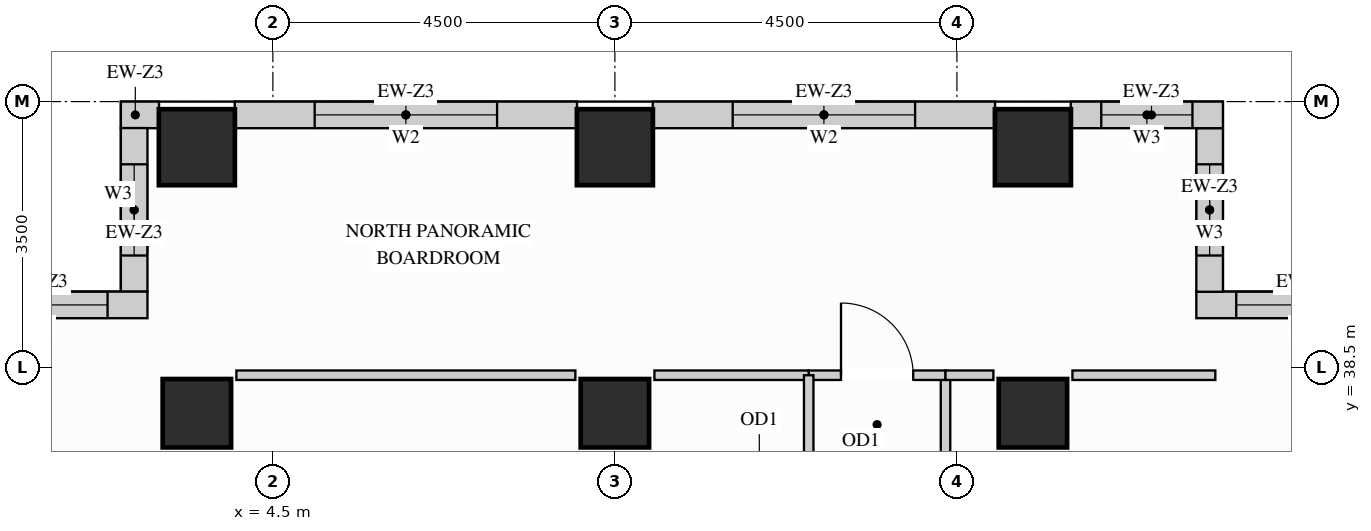
"""IFC4 building model, lengths in metres.
Left out: names, types, materials, properties, quantities, classifications, styles, units other than length and angle.
Written with IfcOpenShell. Run it as: python <this file> out.ifc"""

import sys

from ifc_helpers import new_model, si_unit, direction, frame, frame_2d, origin, origin_2d, place, context, subcontext, project, spatial, rectangle, extrude, source, transform, mapped, element, fill, save


model = new_model("IFC4")
c1 = context("Model", 3, precision=1e-05, world=origin(), true_north=direction((0.0, 1.0)))
c2 = subcontext(c1, "Body", "Model", "MODEL_VIEW")
j1 = project(units=[si_unit("LENGTHUNIT", "METRE"), si_unit("PLANEANGLEUNIT", "RADIAN")], contexts=[c1])
p1 = place(None, origin())
s1 = spatial("IfcSite", under=j1, at=p1, CompositionType="ELEMENT")
p2 = place(p1, origin())
s2 = spatial("IfcBuilding", under=s1, at=p2, CompositionType="ELEMENT")
p3 = place(p2, frame((0.0, 0.0, 186.3)))
s3 = spatial("IfcBuildingStorey", under=s2, at=p3, CompositionType="ELEMENT", Elevation=186.3)
m1 = source(origin(), c2, "Body", "SweptSolid", [
    extrude(rectangle(XDim=0.9, YDim=0.9, at=origin_2d()), origin(), (0.0, 0.0, 1.0), 3.4),
])
for number, where, z_axis, x_axis in (
    (1, (14.5, 37.9, 0.0), (0.0, 0.0, 1.0), (1.0, 0.0, 0.0)),
    (2, (3.5, 37.9, 0.0), (0.0, 0.0, 1.0), (1.0, 0.0, 0.0)),
    (3, (9.0, 37.9, 0.0), (0.0, 0.0, 1.0), (1.0, 0.0, 0.0)),
):
    element("IfcColumn", number, at=place(p3, frame(where, z_axis=z_axis, x_axis=x_axis)), inside=s3, PredefinedType="COLUMN", context=c2, shape_type="MappedRepresentation", body=[
        mapped(m1, transform((0.0, 0.0, 0.0), x_axis=(1.0, 0.0, 0.0), y_axis=(0.0, 1.0, 0.0), z_axis=(0.0, 0.0, 1.0))),
    ])
m2 = source(origin(), c2, "Body", "SweptSolid", [
    extrude(rectangle(XDim=1.0, YDim=1.0, at=origin_2d()), origin(), (0.0, 0.0, 1.0), 3.4),
])
for number, where, z_axis, x_axis in (
    (4, (14.5, 41.4, 0.0), (0.0, 0.0, 1.0), (1.0, 0.0, 0.0)),
    (5, (3.5, 41.4, 0.0), (0.0, 0.0, 1.0), (1.0, 0.0, 0.0)),
    (6, (9.0, 41.4, 0.0), (0.0, 0.0, 1.0), (1.0, 0.0, 0.0)),
):
    element("IfcColumn", number, at=place(p3, frame(where, z_axis=z_axis, x_axis=x_axis)), inside=s3, PredefinedType="COLUMN", context=c2, shape_type="MappedRepresentation", body=[
        mapped(m2, transform((0.0, 0.0, 0.0), x_axis=(1.0, 0.0, 0.0), y_axis=(0.0, 1.0, 0.0), z_axis=(0.0, 0.0, 1.0))),
    ])
p4 = place(p3, frame((19.5, 39.325, 0.0), z_axis=(0.0, 0.0, 1.0), x_axis=(-1.0, 0.0, 0.0)))
e7 = element("IfcWall", 7, at=p4, inside=s3, PredefinedType="SOLIDWALL", context=c2, shape_type="SweptSolid", body=[
    extrude(rectangle(XDim=2.85, YDim=0.35, at=frame_2d((1.425, 0.0))), origin(), (0.0, 0.0, 1.0), 3.385),
])
p5 = place(p4, frame((0.525, 0.0, 0.78)))
e8 = element("IfcOpeningElement", 8, at=p5, cuts=e7, PredefinedType="OPENING", context=c2, shape_type="SweptSolid", body=[
    extrude(rectangle(XDim=1.8, YDim=2.1, at=frame_2d((0.9, 1.05))), frame((0.0, 0.185, 0.0), z_axis=(0.0, -1.0, 0.0), x_axis=(1.0, 0.0, 0.0)), (0.0, 0.0, 1.0), 0.37),
])
p6 = place(p3, frame((16.825, 39.498, 0.0), z_axis=(0.0, 0.0, 1.0), x_axis=(0.0, 1.0, 0.0)))
e9 = element("IfcWall", 9, at=p6, inside=s3, PredefinedType="SOLIDWALL", context=c2, shape_type="SweptSolid", body=[
    extrude(rectangle(XDim=2.154, YDim=0.35, at=frame_2d((1.077, 0.0))), origin(), (0.0, 0.0, 1.0), 3.385),
])
p7 = place(p6, frame((0.477, 0.0, 0.78)))
e10 = element("IfcOpeningElement", 10, at=p7, cuts=e9, PredefinedType="OPENING", context=c2, shape_type="SweptSolid", body=[
    extrude(rectangle(XDim=1.2, YDim=2.1, at=frame_2d((0.6, 1.05))), frame((0.0, 0.185, 0.0), z_axis=(0.0, -1.0, 0.0), x_axis=(1.0, 0.0, 0.0)), (0.0, 0.0, 1.0), 0.37),
])
p8 = place(p3, frame((17.0, 41.825, 0.0), z_axis=(0.0, 0.0, 1.0), x_axis=(-1.0, 0.0, 0.0)))
e11 = element("IfcWall", 11, at=p8, inside=s3, PredefinedType="SOLIDWALL", context=c2, shape_type="SweptSolid", body=[
    extrude(rectangle(XDim=2.002, YDim=0.35, at=frame_2d((1.001, 0.0))), origin(), (0.0, 0.0, 1.0), 3.385),
])
p9 = place(p8, frame((0.401, 0.0, 0.78)))
e12 = element("IfcOpeningElement", 12, at=p9, cuts=e11, PredefinedType="OPENING", context=c2, shape_type="SweptSolid", body=[
    extrude(rectangle(XDim=1.2, YDim=2.1, at=frame_2d((0.6, 1.05))), frame((0.0, 0.185, 0.0), z_axis=(0.0, -1.0, 0.0), x_axis=(1.0, 0.0, 0.0)), (0.0, 0.0, 1.0), 0.37),
])
p10 = place(p3, frame((14.002, 41.825, 0.0), z_axis=(0.0, 0.0, 1.0), x_axis=(-1.0, 0.0, 0.0)))
e13 = element("IfcWall", 13, at=p10, inside=s3, PredefinedType="SOLIDWALL", context=c2, shape_type="SweptSolid", body=[
    extrude(rectangle(XDim=4.504, YDim=0.35, at=frame_2d((2.252, 0.0))), origin(), (0.0, 0.0, 1.0), 2.612),
])
p11 = place(p10, frame((1.052, 0.0, 0.78)))
e14 = element("IfcOpeningElement", 14, at=p11, cuts=e13, PredefinedType="OPENING", context=c2, shape_type="SweptSolid", body=[
    extrude(rectangle(XDim=2.4, YDim=1.652, at=frame_2d((1.2, 0.826))), frame((0.0, 0.185, 0.0), z_axis=(0.0, -1.0, 0.0), x_axis=(1.0, 0.0, 0.0)), (0.0, 0.0, 1.0), 0.37),
])
p12 = place(p3, frame((8.502, 41.825, 0.0), z_axis=(0.0, 0.0, 1.0), x_axis=(-1.0, 0.0, 0.0)))
e15 = element("IfcWall", 15, at=p12, inside=s3, PredefinedType="SOLIDWALL", context=c2, shape_type="SweptSolid", body=[
    extrude(rectangle(XDim=4.504, YDim=0.35, at=frame_2d((2.252, 0.0))), origin(), (0.0, 0.0, 1.0), 2.612),
])
p13 = place(p12, frame((1.052, 0.0, 0.78)))
e16 = element("IfcOpeningElement", 16, at=p13, cuts=e15, PredefinedType="OPENING", context=c2, shape_type="SweptSolid", body=[
    extrude(rectangle(XDim=2.4, YDim=1.652, at=frame_2d((1.2, 0.826))), frame((0.0, 0.185, 0.0), z_axis=(0.0, -1.0, 0.0), x_axis=(1.0, 0.0, 0.0)), (0.0, 0.0, 1.0), 0.37),
])
m3 = source(origin(), c2, "Body", "SweptSolid", [
    extrude(rectangle(XDim=0.502, YDim=0.35, at=frame_2d((0.251, 0.0))), origin(), (0.0, 0.0, 1.0), 3.385),
])
p14 = place(p3, frame((3.002, 41.825, 0.0), z_axis=(0.0, 0.0, 1.0), x_axis=(-1.0, 0.0, 0.0)))
e17 = element("IfcWall", 17, at=p14, inside=s3, PredefinedType="SOLIDWALL", context=c2, shape_type="MappedRepresentation", body=[
    mapped(m3, transform((0.0, 0.0, 0.0), x_axis=(1.0, 0.0, 0.0), y_axis=(0.0, 1.0, 0.0), z_axis=(0.0, 0.0, 1.0))),
])
p15 = place(p3, frame((2.675, 41.652, 0.0), z_axis=(0.0, 0.0, 1.0), x_axis=(0.0, -1.0, 0.0)))
e18 = element("IfcWall", 18, at=p15, inside=s3, PredefinedType="SOLIDWALL", context=c2, shape_type="SweptSolid", body=[
    extrude(rectangle(XDim=2.154, YDim=0.35, at=frame_2d((1.077, 0.0))), origin(), (0.0, 0.0, 1.0), 3.385),
])
p16 = place(p15, frame((0.477, 0.0, 0.78)))
e19 = element("IfcOpeningElement", 19, at=p16, cuts=e18, PredefinedType="OPENING", context=c2, shape_type="SweptSolid", body=[
    extrude(rectangle(XDim=1.2, YDim=2.1, at=frame_2d((0.6, 1.05))), frame((0.0, 0.185, 0.0), z_axis=(0.0, -1.0, 0.0), x_axis=(1.0, 0.0, 0.0)), (0.0, 0.0, 1.0), 0.37),
])
p17 = place(p3, frame((2.85, 39.325, 0.0), z_axis=(0.0, 0.0, 1.0), x_axis=(-1.0, 0.0, 0.0)))
e20 = element("IfcWall", 20, at=p17, inside=s3, PredefinedType="SOLIDWALL", context=c2, shape_type="SweptSolid", body=[
    extrude(rectangle(XDim=2.85, YDim=0.35, at=frame_2d((1.425, 0.0))), origin(), (0.0, 0.0, 1.0), 3.385),
])
p18 = place(p17, frame((0.525, 0.0, 0.78)))
e21 = element("IfcOpeningElement", 21, at=p18, cuts=e20, PredefinedType="OPENING", context=c2, shape_type="SweptSolid", body=[
    extrude(rectangle(XDim=1.8, YDim=2.1, at=frame_2d((0.9, 1.05))), frame((0.0, 0.185, 0.0), z_axis=(0.0, -1.0, 0.0), x_axis=(1.0, 0.0, 0.0)), (0.0, 0.0, 1.0), 0.37),
])
p19 = place(p3, frame((13.35, 35.738, 0.0), z_axis=(0.0, 0.0, 1.0), x_axis=(0.0, 1.0, 0.0)))
e22 = element("IfcWall", 22, at=p19, inside=s3, PredefinedType="PARTITIONING", context=c2, shape_type="SweptSolid", body=[
    extrude(rectangle(XDim=2.662, YDim=0.125, at=frame_2d((1.331, 0.0))), origin(), (0.0, 0.0, 1.0), 3.385),
])
p20 = place(p19, frame((0.18, 0.0, 0.0)))
e23 = element("IfcOpeningElement", 23, at=p20, cuts=e22, PredefinedType="OPENING", context=c2, shape_type="SweptSolid", body=[
    extrude(rectangle(XDim=0.95, YDim=2.15, at=frame_2d((0.475, 1.075))), frame((0.0, 0.073, 0.0), z_axis=(0.0, -1.0, 0.0), x_axis=(1.0, 0.0, 0.0)), (0.0, 0.0, 1.0), 0.145),
])
p21 = place(p3, frame((11.55, 38.4, 0.0), z_axis=(0.0, 0.0, 1.0), x_axis=(1.0, 0.0, 0.0)))
e24 = element("IfcWall", 24, at=p21, inside=s3, PredefinedType="PARTITIONING", context=c2, shape_type="SweptSolid", body=[
    extrude(rectangle(XDim=1.8, YDim=0.125, at=frame_2d((0.9, 0.0))), origin(), (0.0, 0.0, 1.0), 3.385),
])
p22 = place(p21, frame((0.425, 0.0, 0.0)))
e25 = element("IfcOpeningElement", 25, at=p22, cuts=e24, PredefinedType="OPENING", context=c2, shape_type="SweptSolid", body=[
    extrude(rectangle(XDim=0.95, YDim=2.15, at=frame_2d((0.475, 1.075))), frame((0.0, 0.073, 0.0), z_axis=(0.0, -1.0, 0.0), x_axis=(1.0, 0.0, 0.0)), (0.0, 0.0, 1.0), 0.145),
])
m4 = source(origin(), c2, "Body", "SweptSolid", [
    extrude(rectangle(XDim=0.63, YDim=0.125, at=frame_2d((0.315, 0.0))), origin(), (0.0, 0.0, 1.0), 3.385),
])
p23 = place(p3, frame((13.35, 38.4, 0.0), z_axis=(0.0, 0.0, 1.0), x_axis=(1.0, 0.0, 0.0)))
e26 = element("IfcWall", 26, at=p23, inside=s3, PredefinedType="PARTITIONING", context=c2, shape_type="MappedRepresentation", body=[
    mapped(m4, transform((0.0, 0.0, 0.0), x_axis=(1.0, 0.0, 0.0), y_axis=(0.0, 1.0, 0.0), z_axis=(0.0, 0.0, 1.0))),
])
m5 = source(origin(), c2, "Body", "SweptSolid", [
    extrude(rectangle(XDim=1.88, YDim=0.125, at=frame_2d((0.94, 0.0))), origin(), (0.0, 0.0, 1.0), 3.385),
])
p24 = place(p3, frame((15.02, 38.4, 0.0), z_axis=(0.0, 0.0, 1.0), x_axis=(1.0, 0.0, 0.0)))
e27 = element("IfcWall", 27, at=p24, inside=s3, PredefinedType="PARTITIONING", context=c2, shape_type="MappedRepresentation", body=[
    mapped(m5, transform((0.0, 0.0, 0.0), x_axis=(1.0, 0.0, 0.0), y_axis=(0.0, 1.0, 0.0), z_axis=(0.0, 0.0, 1.0))),
])
m6 = source(origin(), c2, "Body", "SweptSolid", [
    extrude(rectangle(XDim=4.46, YDim=0.125, at=frame_2d((2.23, 0.0))), origin(), (0.0, 0.0, 1.0), 3.385),
])
p25 = place(p3, frame((4.02, 38.4, 0.0), z_axis=(0.0, 0.0, 1.0), x_axis=(1.0, 0.0, 0.0)))
e28 = element("IfcWall", 28, at=p25, inside=s3, PredefinedType="PARTITIONING", context=c2, shape_type="MappedRepresentation", body=[
    mapped(m6, transform((0.0, 0.0, 0.0), x_axis=(1.0, 0.0, 0.0), y_axis=(0.0, 1.0, 0.0), z_axis=(0.0, 0.0, 1.0))),
])
m7 = source(origin(), c2, "Body", "SweptSolid", [
    extrude(rectangle(XDim=2.03, YDim=0.125, at=frame_2d((1.015, 0.0))), origin(), (0.0, 0.0, 1.0), 3.385),
])
p26 = place(p3, frame((9.52, 38.4, 0.0), z_axis=(0.0, 0.0, 1.0), x_axis=(1.0, 0.0, 0.0)))
e29 = element("IfcWall", 29, at=p26, inside=s3, PredefinedType="PARTITIONING", context=c2, shape_type="MappedRepresentation", body=[
    mapped(m7, transform((0.0, 0.0, 0.0), x_axis=(1.0, 0.0, 0.0), y_axis=(0.0, 1.0, 0.0), z_axis=(0.0, 0.0, 1.0))),
])
p27 = place(p3, frame((11.55, 35.012, 0.0), z_axis=(0.0, 0.0, 1.0), x_axis=(0.0, 1.0, 0.0)))
e30 = element("IfcWall", 30, at=p27, inside=s3, PredefinedType="PARTITIONING", context=c2, shape_type="SweptSolid", body=[
    extrude(rectangle(XDim=3.388, YDim=0.125, at=frame_2d((1.694, 0.0))), origin(), (0.0, 0.0, 1.0), 3.385),
])
p28 = place(p27, frame((1.219, 0.0, 0.0)))
e31 = element("IfcOpeningElement", 31, at=p28, cuts=e30, PredefinedType="OPENING", context=c2, shape_type="SweptSolid", body=[
    extrude(rectangle(XDim=0.95, YDim=2.15, at=frame_2d((0.475, 1.075))), frame((0.0, 0.073, 0.0), z_axis=(0.0, -1.0, 0.0), x_axis=(1.0, 0.0, 0.0)), (0.0, 0.0, 1.0), 0.145),
])
m8 = source(origin(), c2, "Body", "SweptSolid", [
    extrude(rectangle(XDim=0.95, YDim=2.15, at=frame_2d((0.475, 1.075))), frame((0.0, 0.025, 0.0), z_axis=(0.0, -1.0, 0.0), x_axis=(1.0, 0.0, 0.0)), (0.0, 0.0, 1.0), 0.05),
])
p29 = place(p22, origin())
e32 = element("IfcDoor", 32, at=p29, inside=s3, OperationType="SINGLE_SWING_LEFT", PredefinedType="DOOR", context=c2, shape_type="MappedRepresentation", body=[
    mapped(m8, transform((0.0, 0.0, 0.0), x_axis=(1.0, 0.0, 0.0), y_axis=(0.0, 1.0, 0.0), z_axis=(0.0, 0.0, 1.0))),
])
fill(e25, e32)
m9 = source(origin(), c2, "Body", "SweptSolid", [
    extrude(rectangle(XDim=1.8, YDim=2.1, at=frame_2d((0.9, 1.05))), frame((0.0, 0.03, 0.0), z_axis=(0.0, -1.0, 0.0), x_axis=(1.0, 0.0, 0.0)), (0.0, 0.0, 1.0), 0.06),
])
p30 = place(p5, origin())
e33 = element("IfcWindow", 33, at=p30, inside=s3, PartitioningType="SINGLE_PANEL", PredefinedType="WINDOW", context=c2, shape_type="MappedRepresentation", body=[
    mapped(m9, transform((0.0, 0.0, 0.0), x_axis=(1.0, 0.0, 0.0), y_axis=(0.0, 1.0, 0.0), z_axis=(0.0, 0.0, 1.0))),
])
fill(e8, e33)
p31 = place(p18, origin())
e34 = element("IfcWindow", 34, at=p31, inside=s3, PartitioningType="SINGLE_PANEL", PredefinedType="WINDOW", context=c2, shape_type="MappedRepresentation", body=[
    mapped(m9, transform((0.0, 0.0, 0.0), x_axis=(1.0, 0.0, 0.0), y_axis=(0.0, 1.0, 0.0), z_axis=(0.0, 0.0, 1.0))),
])
fill(e21, e34)
m10 = source(origin(), c2, "Body", "SweptSolid", [
    extrude(rectangle(XDim=2.4, YDim=1.652, at=frame_2d((1.2, 0.826))), frame((0.0, 0.03, 0.0), z_axis=(0.0, -1.0, 0.0), x_axis=(1.0, 0.0, 0.0)), (0.0, 0.0, 1.0), 0.06),
])
p32 = place(p11, origin())
e35 = element("IfcWindow", 35, at=p32, inside=s3, PartitioningType="SINGLE_PANEL", PredefinedType="WINDOW", context=c2, shape_type="MappedRepresentation", body=[
    mapped(m10, transform((0.0, 0.0, 0.0), x_axis=(1.0, 0.0, 0.0), y_axis=(0.0, 1.0, 0.0), z_axis=(0.0, 0.0, 1.0))),
])
fill(e14, e35)
p33 = place(p13, origin())
e36 = element("IfcWindow", 36, at=p33, inside=s3, PartitioningType="SINGLE_PANEL", PredefinedType="WINDOW", context=c2, shape_type="MappedRepresentation", body=[
    mapped(m10, transform((0.0, 0.0, 0.0), x_axis=(1.0, 0.0, 0.0), y_axis=(0.0, 1.0, 0.0), z_axis=(0.0, 0.0, 1.0))),
])
fill(e16, e36)
m11 = source(origin(), c2, "Body", "SweptSolid", [
    extrude(rectangle(XDim=1.2, YDim=2.1, at=frame_2d((0.6, 1.05))), frame((0.0, 0.03, 0.0), z_axis=(0.0, -1.0, 0.0), x_axis=(1.0, 0.0, 0.0)), (0.0, 0.0, 1.0), 0.06),
])
p34 = place(p7, origin())
e37 = element("IfcWindow", 37, at=p34, inside=s3, PartitioningType="SINGLE_PANEL", PredefinedType="WINDOW", context=c2, shape_type="MappedRepresentation", body=[
    mapped(m11, transform((0.0, 0.0, 0.0), x_axis=(1.0, 0.0, 0.0), y_axis=(0.0, 1.0, 0.0), z_axis=(0.0, 0.0, 1.0))),
])
fill(e10, e37)
p35 = place(p9, origin())
e38 = element("IfcWindow", 38, at=p35, inside=s3, PartitioningType="SINGLE_PANEL", PredefinedType="WINDOW", context=c2, shape_type="MappedRepresentation", body=[
    mapped(m11, transform((0.0, 0.0, 0.0), x_axis=(1.0, 0.0, 0.0), y_axis=(0.0, 1.0, 0.0), z_axis=(0.0, 0.0, 1.0))),
])
fill(e12, e38)
p36 = place(p16, origin())
e39 = element("IfcWindow", 39, at=p36, inside=s3, PartitioningType="SINGLE_PANEL", PredefinedType="WINDOW", context=c2, shape_type="MappedRepresentation", body=[
    mapped(m11, transform((0.0, 0.0, 0.0), x_axis=(1.0, 0.0, 0.0), y_axis=(0.0, 1.0, 0.0), z_axis=(0.0, 0.0, 1.0))),
])
fill(e19, e39)
save(model, sys.argv[1])
